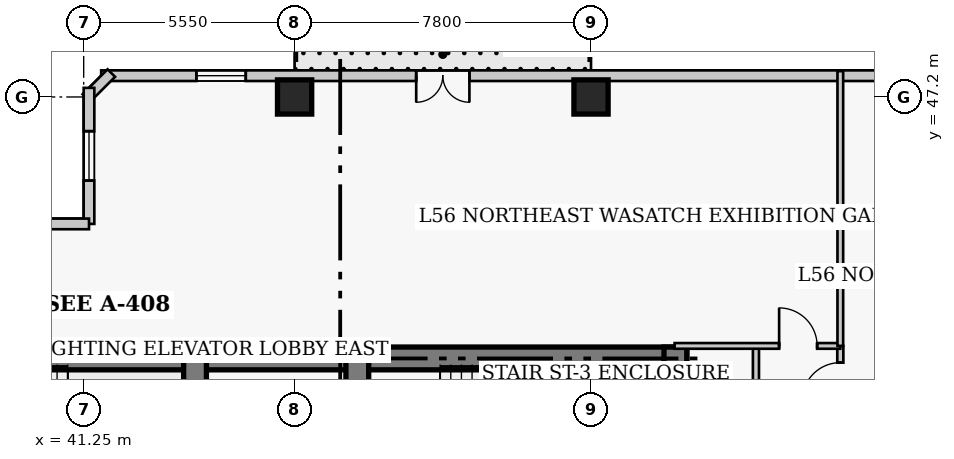
"""IFC4 building model, lengths in metres.
Left out: names, types, materials, properties, quantities, classifications, styles, units other than length and angle.
Written with IfcOpenShell. Run it as: python <this file> out.ifc"""

import sys

from ifc_helpers import new_model, si_unit, direction, frame, frame_2d, origin, origin_2d, place, context, subcontext, project, spatial, rectangle, extrude, element, fill, save


model = new_model("IFC4")
c1 = context("Model", 3, precision=1e-05, world=origin(), true_north=direction((0.0, 1.0)))
c2 = subcontext(c1, "Body", "Model", "MODEL_VIEW")
j1 = project(units=[si_unit("LENGTHUNIT", "METRE"), si_unit("PLANEANGLEUNIT", "RADIAN")], contexts=[c1])
p1 = place(None, origin())
s1 = spatial("IfcSite", under=j1, at=p1, CompositionType="ELEMENT")
p2 = place(p1, origin())
s2 = spatial("IfcBuilding", under=s1, at=p2, CompositionType="ELEMENT")
p3 = place(p2, frame((0.0, 0.0, 224.1)))
s3 = spatial("IfcBuildingStorey", under=s2, at=p3, CompositionType="ELEMENT", Elevation=224.1)
p4 = place(p3, frame((35.85, 40.32, 0.0), z_axis=(0.0, 0.0, 1.0), x_axis=(1.0, 0.0, 0.0)))
e1 = element("IfcWall", 1, at=p4, inside=s3, PredefinedType="SHEAR", context=c2, shape_type="SweptSolid", body=[
    extrude(rectangle(XDim=12.6, YDim=0.6, at=frame_2d((6.3, 0.0))), origin(), (0.0, 0.0, 1.0), 3.9),
])
p5 = place(p3, frame((48.45, 40.32, 0.0), z_axis=(0.0, 0.0, 1.0), x_axis=(1.0, 0.0, 0.0)))
e2 = element("IfcWall", 2, at=p5, inside=s3, PredefinedType="SHEAR", context=c2, shape_type="SweptSolid", body=[
    extrude(rectangle(XDim=8.67, YDim=0.6, at=frame_2d((4.335, 0.0))), origin(), (0.0, 0.0, 1.0), 3.9),
])
p6 = place(p3, frame((56.82, 27.05, 0.0), z_axis=(0.0, 0.0, 1.0), x_axis=(0.0, 1.0, 0.0)))
e3 = element("IfcWall", 3, at=p6, inside=s3, PredefinedType="SHEAR", context=c2, shape_type="SweptSolid", body=[
    extrude(rectangle(XDim=13.57, YDim=0.6, at=frame_2d((6.785, 0.0))), origin(), (0.0, 0.0, 1.0), 3.9),
])
p7 = place(p3, frame((44.18, 36.37, 0.0), z_axis=(0.0, 0.0, 1.0), x_axis=(0.0, 1.0, 0.0)))
e4 = element("IfcWall", 4, at=p7, inside=s3, PredefinedType="SHEAR", context=c2, shape_type="SweptSolid", body=[
    extrude(rectangle(XDim=3.95, YDim=0.6, at=frame_2d((1.975, 0.0))), origin(), (0.0, 0.0, 1.0), 3.9),
])
p8 = place(p3, frame((48.45, 32.45, 0.0), z_axis=(0.0, 0.0, 1.0), x_axis=(0.0, 1.0, 0.0)))
e5 = element("IfcWall", 5, at=p8, inside=s3, PredefinedType="SHEAR", context=c2, shape_type="SweptSolid", body=[
    extrude(rectangle(XDim=7.87, YDim=0.6, at=frame_2d((3.935, 0.0))), origin(), (0.0, 0.0, 1.0), 3.9),
])
p9 = place(p8, frame((5.75, 0.0, 0.0)))
e6 = element("IfcOpeningElement", 6, at=p9, cuts=e5, PredefinedType="OPENING", context=c2, shape_type="SweptSolid", body=[
    extrude(rectangle(XDim=1.1, YDim=2.15, at=frame_2d((0.55, 1.075))), frame((0.0, 0.31, 0.0), z_axis=(0.0, -1.0, 0.0), x_axis=(1.0, 0.0, 0.0)), (0.0, 0.0, 1.0), 0.62),
])
for number, where, z_axis, x_axis in (
    (7, (46.8, 47.2, 0.0), (0.0, 0.0, 1.0), (1.0, 0.0, 0.0)),
    (8, (54.6, 47.2, 0.0), (0.0, 0.0, 1.0), (1.0, 0.0, 0.0)),
):
    element("IfcColumn", number, at=place(p3, frame(where, z_axis=z_axis, x_axis=x_axis)), inside=s3, PredefinedType="COLUMN", context=c2, shape_type="SweptSolid", body=[
        extrude(rectangle(XDim=0.9, YDim=0.9, at=origin_2d()), origin(), (0.0, 0.0, 1.0), 3.9),
    ])
p10 = place(p3, frame((67.54, 47.76, 0.0), z_axis=(0.0, 0.0, 1.0), x_axis=(-1.0, 0.0, 0.0)))
e9 = element("IfcWall", 9, at=p10, inside=s3, PredefinedType="SOLIDWALL", context=c2, shape_type="SweptSolid", body=[
    extrude(rectangle(XDim=25.83, YDim=0.28, at=frame_2d((12.915, 0.0))), origin(), (0.0, 0.0, 1.0), 3.65),
])
p11 = place(p10, frame((16.14, 0.0, 0.0)))
e10 = element("IfcOpeningElement", 10, at=p11, cuts=e9, PredefinedType="OPENING", context=c2, shape_type="SweptSolid", body=[
    extrude(rectangle(XDim=1.4, YDim=2.15, at=frame_2d((0.7, 1.075))), frame((0.0, 0.15, 0.0), z_axis=(0.0, -1.0, 0.0), x_axis=(1.0, 0.0, 0.0)), (0.0, 0.0, 1.0), 0.3),
])
p12 = place(p10, frame((3.655, 0.0, 0.85)))
e11 = element("IfcOpeningElement", 11, at=p12, cuts=e9, PredefinedType="OPENING", context=c2, shape_type="SweptSolid", body=[
    extrude(rectangle(XDim=1.3, YDim=1.7, at=frame_2d((0.65, 0.85))), frame((0.0, 0.15, 0.0), z_axis=(0.0, -1.0, 0.0), x_axis=(1.0, 0.0, 0.0)), (0.0, 0.0, 1.0), 0.3),
])
p13 = place(p10, frame((22.025, 0.0, 0.85)))
e12 = element("IfcOpeningElement", 12, at=p13, cuts=e9, PredefinedType="OPENING", context=c2, shape_type="SweptSolid", body=[
    extrude(rectangle(XDim=1.3, YDim=1.7, at=frame_2d((0.65, 0.85))), frame((0.0, 0.15, 0.0), z_axis=(0.0, -1.0, 0.0), x_axis=(1.0, 0.0, 0.0)), (0.0, 0.0, 1.0), 0.3),
])
p14 = place(p3, frame((41.977, 47.829, 0.0), z_axis=(0.0, 0.0, 1.0), x_axis=(-0.706975312048, -0.707238225886, 0.0)))
e13 = element("IfcWall", 13, at=p14, inside=s3, PredefinedType="SOLIDWALL", context=c2, shape_type="SweptSolid", body=[
    extrude(rectangle(XDim=0.929, YDim=0.28, at=frame_2d((0.464, 0.0))), origin(), (0.0, 0.0, 1.0), 3.65),
])
p15 = place(p3, frame((41.39, 47.44, 0.0), z_axis=(0.0, 0.0, 1.0), x_axis=(0.0, -1.0, 0.0)))
e14 = element("IfcWall", 14, at=p15, inside=s3, PredefinedType="SOLIDWALL", context=c2, shape_type="SweptSolid", body=[
    extrude(rectangle(XDim=3.58, YDim=0.28, at=frame_2d((1.79, 0.0))), origin(), (0.0, 0.0, 1.0), 3.65),
])
p16 = place(p15, frame((1.14, 0.0, 0.85)))
e15 = element("IfcOpeningElement", 15, at=p16, cuts=e14, PredefinedType="OPENING", context=c2, shape_type="SweptSolid", body=[
    extrude(rectangle(XDim=1.3, YDim=1.7, at=frame_2d((0.65, 0.85))), frame((0.0, 0.15, 0.0), z_axis=(0.0, -1.0, 0.0), x_axis=(1.0, 0.0, 0.0)), (0.0, 0.0, 1.0), 0.3),
])
p17 = place(p3, frame((41.39, 43.86, 0.0), z_axis=(0.0, 0.0, 1.0), x_axis=(-1.0, 0.0, 0.0)))
e16 = element("IfcWall", 16, at=p17, inside=s3, PredefinedType="SOLIDWALL", context=c2, shape_type="SweptSolid", body=[
    extrude(rectangle(XDim=4.78, YDim=0.28, at=frame_2d((2.39, 0.0))), origin(), (0.0, 0.0, 1.0), 3.65),
])
p18 = place(p17, frame((1.74, 0.0, 0.85)))
e17 = element("IfcOpeningElement", 17, at=p18, cuts=e16, PredefinedType="OPENING", context=c2, shape_type="SweptSolid", body=[
    extrude(rectangle(XDim=1.3, YDim=1.7, at=frame_2d((0.65, 0.85))), frame((0.0, 0.15, 0.0), z_axis=(0.0, -1.0, 0.0), x_axis=(1.0, 0.0, 0.0)), (0.0, 0.0, 1.0), 0.3),
])
p19 = place(p3, frame((61.16, 11.95, 0.0), z_axis=(0.0, 0.0, 1.0), x_axis=(0.0, 1.0, 0.0)))
e18 = element("IfcWall", 18, at=p19, inside=s3, PredefinedType="PARTITIONING", context=c2, shape_type="SweptSolid", body=[
    extrude(rectangle(XDim=28.7, YDim=0.16, at=frame_2d((14.35, 0.0))), origin(), (0.0, 0.0, 1.0), 3.65),
])
p20 = place(p19, frame((3.55, 0.0, 0.0)))
e19 = element("IfcOpeningElement", 19, at=p20, cuts=e18, PredefinedType="OPENING", context=c2, shape_type="SweptSolid", body=[
    extrude(rectangle(XDim=0.95, YDim=2.1, at=frame_2d((0.475, 1.05))), frame((0.0, 0.09, 0.0), z_axis=(0.0, -1.0, 0.0), x_axis=(1.0, 0.0, 0.0)), (0.0, 0.0, 1.0), 0.18),
])
p21 = place(p19, frame((11.975, 0.0, 0.0)))
e20 = element("IfcOpeningElement", 20, at=p21, cuts=e18, PredefinedType="OPENING", context=c2, shape_type="SweptSolid", body=[
    extrude(rectangle(XDim=0.95, YDim=2.1, at=frame_2d((0.475, 1.05))), frame((0.0, 0.09, 0.0), z_axis=(0.0, -1.0, 0.0), x_axis=(1.0, 0.0, 0.0)), (0.0, 0.0, 1.0), 0.18),
])
p22 = place(p19, frame((20.425, 0.0, 0.0)))
e21 = element("IfcOpeningElement", 21, at=p22, cuts=e18, PredefinedType="OPENING", context=c2, shape_type="SweptSolid", body=[
    extrude(rectangle(XDim=0.95, YDim=2.1, at=frame_2d((0.475, 1.05))), frame((0.0, 0.09, 0.0), z_axis=(0.0, -1.0, 0.0), x_axis=(1.0, 0.0, 0.0)), (0.0, 0.0, 1.0), 0.18),
])
p23 = place(p19, frame((27.26, 0.0, 0.0)))
e22 = element("IfcOpeningElement", 22, at=p23, cuts=e18, PredefinedType="OPENING", context=c2, shape_type="SweptSolid", body=[
    extrude(rectangle(XDim=1.0, YDim=2.15, at=frame_2d((0.5, 1.075))), frame((0.0, 0.09, 0.0), z_axis=(0.0, -1.0, 0.0), x_axis=(1.0, 0.0, 0.0)), (0.0, 0.0, 1.0), 0.18),
])
p24 = place(p3, frame((58.94, 18.86, 0.0), z_axis=(0.0, 0.0, 1.0), x_axis=(0.0, 1.0, 0.0)))
e23 = element("IfcWall", 23, at=p24, inside=s3, PredefinedType="PARTITIONING", context=c2, shape_type="SweptSolid", body=[
    extrude(rectangle(XDim=21.79, YDim=0.16, at=frame_2d((10.895, 0.0))), origin(), (0.0, 0.0, 1.0), 3.65),
])
p25 = place(p3, frame((56.8, 40.65, 0.0), z_axis=(0.0, 0.0, 1.0), x_axis=(1.0, 0.0, 0.0)))
e24 = element("IfcWall", 24, at=p25, inside=s3, PredefinedType="PARTITIONING", context=c2, shape_type="SweptSolid", body=[
    extrude(rectangle(XDim=4.36, YDim=0.15, at=frame_2d((2.18, 0.0))), origin(), (0.0, 0.0, 1.0), 3.65),
])
p26 = place(p25, frame((2.75, 0.0, 0.0)))
e25 = element("IfcOpeningElement", 25, at=p26, cuts=e24, PredefinedType="OPENING", context=c2, shape_type="SweptSolid", body=[
    extrude(rectangle(XDim=1.0, YDim=2.15, at=frame_2d((0.5, 1.075))), frame((0.0, 0.085, 0.0), z_axis=(0.0, -1.0, 0.0), x_axis=(1.0, 0.0, 0.0)), (0.0, 0.0, 1.0), 0.17),
])
p27 = place(p3, frame((61.16, 40.65, 0.0), z_axis=(0.0, 0.0, 1.0), x_axis=(0.0, 1.0, 0.0)))
e26 = element("IfcWall", 26, at=p27, inside=s3, PredefinedType="PARTITIONING", context=c2, shape_type="SweptSolid", body=[
    extrude(rectangle(XDim=7.23, YDim=0.15, at=frame_2d((3.615, 0.0))), origin(), (0.0, 0.0, 1.0), 3.65),
])
p28 = place(p11, origin())
e27 = element("IfcDoor", 27, at=p28, inside=s3, OperationType="DOUBLE_DOOR_SINGLE_SWING", PredefinedType="DOOR", context=c2, shape_type="SweptSolid", body=[
    extrude(rectangle(XDim=1.4, YDim=2.15, at=frame_2d((0.7, 1.075))), frame((0.0, 0.025, 0.0), z_axis=(0.0, -1.0, 0.0), x_axis=(1.0, 0.0, 0.0)), (0.0, 0.0, 1.0), 0.05),
])
fill(e10, e27)
p29 = place(p13, origin())
e28 = element("IfcWindow", 28, at=p29, inside=s3, PartitioningType="SINGLE_PANEL", PredefinedType="WINDOW", context=c2, shape_type="SweptSolid", body=[
    extrude(rectangle(XDim=1.3, YDim=1.7, at=frame_2d((0.65, 0.85))), frame((0.0, 0.03, 0.0), z_axis=(0.0, -1.0, 0.0), x_axis=(1.0, 0.0, 0.0)), (0.0, 0.0, 1.0), 0.06),
])
fill(e12, e28)
p30 = place(p16, origin())
e29 = element("IfcWindow", 29, at=p30, inside=s3, PartitioningType="SINGLE_PANEL", PredefinedType="WINDOW", context=c2, shape_type="SweptSolid", body=[
    extrude(rectangle(XDim=1.3, YDim=1.7, at=frame_2d((0.65, 0.85))), frame((0.0, 0.03, 0.0), z_axis=(0.0, -1.0, 0.0), x_axis=(1.0, 0.0, 0.0)), (0.0, 0.0, 1.0), 0.06),
])
fill(e15, e29)
p31 = place(p26, origin())
e30 = element("IfcDoor", 30, at=p31, inside=s3, OperationType="SINGLE_SWING_LEFT", PredefinedType="DOOR", context=c2, shape_type="SweptSolid", body=[
    extrude(rectangle(XDim=1.0, YDim=2.15, at=frame_2d((0.5, 1.075))), frame((0.0, 0.025, 0.0), z_axis=(0.0, -1.0, 0.0), x_axis=(1.0, 0.0, 0.0)), (0.0, 0.0, 1.0), 0.05),
])
fill(e25, e30)
p32 = place(p23, origin())
e31 = element("IfcDoor", 31, at=p32, inside=s3, OperationType="SINGLE_SWING_LEFT", PredefinedType="DOOR", context=c2, shape_type="SweptSolid", body=[
    extrude(rectangle(XDim=1.0, YDim=2.15, at=frame_2d((0.5, 1.075))), frame((0.0, 0.025, 0.0), z_axis=(0.0, -1.0, 0.0), x_axis=(1.0, 0.0, 0.0)), (0.0, 0.0, 1.0), 0.05),
])
fill(e22, e31)
save(model, sys.argv[1])
